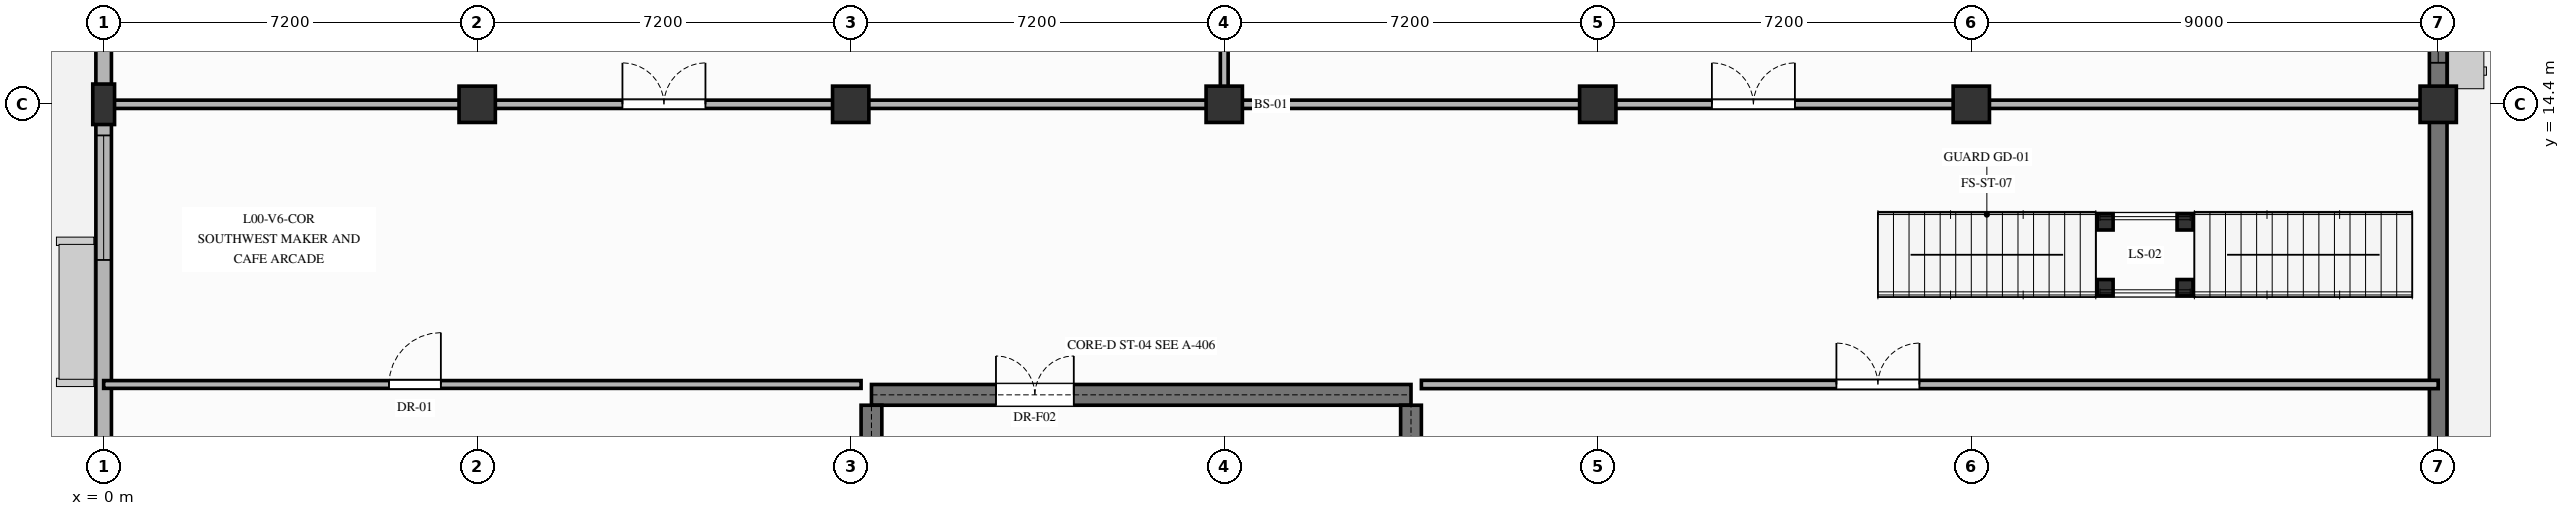
"""IFC4 building model, lengths in metres.
Left out: names, types, materials, properties, quantities, classifications, styles, units other than length and angle.
Written with IfcOpenShell. Run it as: python <this file> out.ifc"""

import sys

from ifc_helpers import new_model, si_unit, direction, frame, frame_2d, origin, origin_2d, place, context, subcontext, project, spatial, rectangle, i_section, extrude, element, fill, save


model = new_model("IFC4")
c1 = context("Model", 3, precision=1e-05, world=origin(), true_north=direction((0.0, 1.0)))
c2 = subcontext(c1, "Body", "Model", "MODEL_VIEW")
j1 = project(units=[si_unit("LENGTHUNIT", "METRE"), si_unit("PLANEANGLEUNIT", "RADIAN")], contexts=[c1])
p1 = place(None, origin())
s1 = spatial("IfcSite", under=j1, at=p1, CompositionType="ELEMENT")
p2 = place(p1, origin())
s2 = spatial("IfcBuilding", under=s1, at=p2, CompositionType="ELEMENT")
p3 = place(p2, origin())
s3 = spatial("IfcBuildingStorey", under=s2, at=p3, CompositionType="ELEMENT", Elevation=0.0)
p4 = place(p3, frame((0.0, 14.4, 0.0), z_axis=(0.0, 0.0, 1.0), x_axis=(1.0, 0.0, 0.0)))
e1 = element("IfcColumn", 1, at=p4, inside=s3, PredefinedType="PILASTER", context=c2, shape_type="SweptSolid", body=[
    extrude(rectangle(XDim=0.42, YDim=0.78, at=origin_2d()), origin(), (0.0, 0.0, 1.0), 5.1),
])
for number, where, z_axis, x_axis in (
    (2, (7.2, 14.4, 0.0), (0.0, 0.0, 1.0), (1.0, 0.0, 0.0)),
    (3, (14.4, 14.4, 0.0), (0.0, 0.0, 1.0), (1.0, 0.0, 0.0)),
    (4, (21.6, 14.4, 0.0), (0.0, 0.0, 1.0), (1.0, 0.0, 0.0)),
    (5, (28.8, 14.4, 0.0), (0.0, 0.0, 1.0), (1.0, 0.0, 0.0)),
    (6, (36.0, 14.4, 0.0), (0.0, 0.0, 1.0), (1.0, 0.0, 0.0)),
    (7, (45.0, 14.4, 0.0), (0.0, 0.0, 1.0), (1.0, 0.0, 0.0)),
):
    element("IfcColumn", number, at=place(p3, frame(where, z_axis=z_axis, x_axis=x_axis)), inside=s3, PredefinedType="COLUMN", context=c2, shape_type="SweptSolid", body=[
        extrude(rectangle(XDim=0.7, YDim=0.7, at=origin_2d()), origin(), (0.0, 0.0, 1.0), 5.1),
    ])
for number, where, z_axis, x_axis in (
    (8, (38.58, 10.865, 0.0), (0.0, 0.0, 1.0), (1.0, 0.0, 0.0)),
    (9, (40.12, 10.865, 0.0), (0.0, 0.0, 1.0), (1.0, 0.0, 0.0)),
    (10, (38.58, 12.135, 0.0), (0.0, 0.0, 1.0), (1.0, 0.0, 0.0)),
    (11, (40.12, 12.135, 0.0), (0.0, 0.0, 1.0), (1.0, 0.0, 0.0)),
):
    element("IfcColumn", number, at=place(p3, frame(where, z_axis=z_axis, x_axis=x_axis)), inside=s3, PredefinedType="COLUMN", context=c2, shape_type="SweptSolid", body=[
        extrude(i_section(OverallWidth=0.307, OverallDepth=0.315, WebThickness=0.012, FlangeThickness=0.019, at=origin_2d()), origin(), (0.0, 0.0, 1.0), 2.33),
    ])
p5 = place(p3, frame((0.0, 7.2, 0.0), z_axis=(0.0, 0.0, 1.0), x_axis=(0.0, 1.0, 0.0)))
e12 = element("IfcWall", 12, at=p5, inside=s3, PredefinedType="SOLIDWALL", context=c2, shape_type="SweptSolid", body=[
    extrude(rectangle(XDim=7.2, YDim=0.3, at=frame_2d((3.6, 0.0))), origin(), (0.0, 0.0, 1.0), 4.115),
])
p6 = place(p5, frame((4.2, 0.0, 0.9)))
e13 = element("IfcOpeningElement", 13, at=p6, cuts=e12, PredefinedType="OPENING", context=c2, shape_type="SweptSolid", body=[
    extrude(rectangle(XDim=2.4, YDim=2.4, at=frame_2d((1.2, 1.2))), frame((0.0, 0.16, 0.0), z_axis=(0.0, -1.0, 0.0), x_axis=(1.0, 0.0, 0.0)), (0.0, 0.0, 1.0), 0.32),
])
p7 = place(p3, frame((0.0, 14.4, 0.0), z_axis=(0.0, 0.0, 1.0), x_axis=(0.0, 1.0, 0.0)))
e14 = element("IfcWall", 14, at=p7, inside=s3, PredefinedType="SOLIDWALL", context=c2, shape_type="SweptSolid", body=[
    extrude(rectangle(XDim=7.2, YDim=0.3, at=frame_2d((3.6, 0.0))), origin(), (0.0, 0.0, 1.0), 4.115),
])
p8 = place(p7, frame((2.0, 0.0, 0.9)))
e15 = element("IfcOpeningElement", 15, at=p8, cuts=e14, PredefinedType="OPENING", context=c2, shape_type="SweptSolid", body=[
    extrude(rectangle(XDim=2.4, YDim=2.4, at=frame_2d((1.2, 1.2))), frame((0.0, 0.16, 0.0), z_axis=(0.0, -1.0, 0.0), x_axis=(1.0, 0.0, 0.0)), (0.0, 0.0, 1.0), 0.32),
])
p9 = place(p3, frame((45.0, 0.0, 0.0), z_axis=(0.0, 0.0, 1.0), x_axis=(0.0, 1.0, 0.0)))
e16 = element("IfcWall", 16, at=p9, inside=s3, PredefinedType="SOLIDWALL", context=c2, shape_type="SweptSolid", body=[
    extrude(rectangle(XDim=28.8, YDim=0.34, at=frame_2d((14.4, 0.0))), origin(), (0.0, 0.0, 1.0), 4.8),
])
p10 = place(p9, frame((18.5, 0.0, 0.0)))
e17 = element("IfcOpeningElement", 17, at=p10, cuts=e16, PredefinedType="OPENING", context=c2, shape_type="SweptSolid", body=[
    extrude(rectangle(XDim=1.6, YDim=2.4, at=frame_2d((0.8, 1.2))), frame((0.0, 0.18, 0.0), z_axis=(0.0, -1.0, 0.0), x_axis=(1.0, 0.0, 0.0)), (0.0, 0.0, 1.0), 0.36),
])
p11 = place(p9, frame((2.8, 0.0, 0.9)))
e18 = element("IfcOpeningElement", 18, at=p11, cuts=e16, PredefinedType="OPENING", context=c2, shape_type="SweptSolid", body=[
    extrude(rectangle(XDim=2.4, YDim=2.4, at=frame_2d((1.2, 1.2))), frame((0.0, 0.18, 0.0), z_axis=(0.0, -1.0, 0.0), x_axis=(1.0, 0.0, 0.0)), (0.0, 0.0, 1.0), 0.36),
])
p12 = place(p9, frame((15.2, 0.0, 0.9)))
e19 = element("IfcOpeningElement", 19, at=p12, cuts=e16, PredefinedType="OPENING", context=c2, shape_type="SweptSolid", body=[
    extrude(rectangle(XDim=1.6, YDim=2.05, at=frame_2d((0.8, 1.025))), frame((0.0, 0.18, 0.0), z_axis=(0.0, -1.0, 0.0), x_axis=(1.0, 0.0, 0.0)), (0.0, 0.0, 1.0), 0.36),
])
p13 = place(p3, frame((14.8, 8.8, 0.0), z_axis=(0.0, 0.0, 1.0), x_axis=(1.0, 0.0, 0.0)))
e20 = element("IfcWall", 20, at=p13, inside=s3, PredefinedType="SHEAR", context=c2, shape_type="SweptSolid", body=[
    extrude(rectangle(XDim=10.4, YDim=0.4, at=frame_2d((5.2, 0.0))), origin(), (0.0, 0.0, 1.0), 4.8),
])
p14 = place(p13, frame((2.4, 0.0, 0.0)))
e21 = element("IfcOpeningElement", 21, at=p14, cuts=e20, PredefinedType="OPENING", context=c2, shape_type="SweptSolid", body=[
    extrude(rectangle(XDim=1.5, YDim=2.2, at=frame_2d((0.75, 1.1))), frame((0.0, 0.21, 0.0), z_axis=(0.0, -1.0, 0.0), x_axis=(1.0, 0.0, 0.0)), (0.0, 0.0, 1.0), 0.42),
])
for number, where, z_axis, x_axis in (
    (22, (14.8, 0.17, 0.0), (0.0, 0.0, 1.0), (0.0, 1.0, 0.0)),
    (23, (25.2, 0.17, 0.0), (0.0, 0.0, 1.0), (0.0, 1.0, 0.0)),
):
    element("IfcWall", number, at=place(p3, frame(where, z_axis=z_axis, x_axis=x_axis)), inside=s3, PredefinedType="SHEAR", context=c2, shape_type="SweptSolid", body=[
        extrude(rectangle(XDim=8.43, YDim=0.4, at=frame_2d((4.215, 0.0))), origin(), (0.0, 0.0, 1.0), 4.8),
    ])
p15 = place(p3, frame((25.4, 9.0, 0.0), z_axis=(0.0, 0.0, 1.0), x_axis=(1.0, 0.0, 0.0)))
e24 = element("IfcWall", 24, at=p15, inside=s3, PredefinedType="PARTITIONING", context=c2, shape_type="SweptSolid", body=[
    extrude(rectangle(XDim=19.6, YDim=0.16, at=frame_2d((9.8, 0.0))), origin(), (0.0, 0.0, 1.0), 4.8),
])
p16 = place(p15, frame((8.0, 0.0, 0.0)))
e25 = element("IfcOpeningElement", 25, at=p16, cuts=e24, PredefinedType="OPENING", context=c2, shape_type="SweptSolid", body=[
    extrude(rectangle(XDim=1.6, YDim=2.2, at=frame_2d((0.8, 1.1))), frame((0.0, 0.09, 0.0), z_axis=(0.0, -1.0, 0.0), x_axis=(1.0, 0.0, 0.0)), (0.0, 0.0, 1.0), 0.18),
])
p17 = place(p3, frame((0.0, 9.0, 0.0), z_axis=(0.0, 0.0, 1.0), x_axis=(1.0, 0.0, 0.0)))
e26 = element("IfcWall", 26, at=p17, inside=s3, PredefinedType="PARTITIONING", context=c2, shape_type="SweptSolid", body=[
    extrude(rectangle(XDim=14.6, YDim=0.15, at=frame_2d((7.3, 0.0))), origin(), (0.0, 0.0, 1.0), 4.8),
])
p18 = place(p17, frame((5.5, 0.0, 0.0)))
e27 = element("IfcOpeningElement", 27, at=p18, cuts=e26, PredefinedType="OPENING", context=c2, shape_type="SweptSolid", body=[
    extrude(rectangle(XDim=1.0, YDim=2.15, at=frame_2d((0.5, 1.075))), frame((0.0, 0.085, 0.0), z_axis=(0.0, -1.0, 0.0), x_axis=(1.0, 0.0, 0.0)), (0.0, 0.0, 1.0), 0.17),
])
p19 = place(p3, frame((0.0, 14.4, 0.0), z_axis=(0.0, 0.0, 1.0), x_axis=(1.0, 0.0, 0.0)))
e28 = element("IfcWall", 28, at=p19, inside=s3, PredefinedType="PARTITIONING", context=c2, shape_type="SweptSolid", body=[
    extrude(rectangle(XDim=45.0, YDim=0.16, at=frame_2d((22.5, 0.0))), origin(), (0.0, 0.0, 1.0), 4.065),
])
p20 = place(p19, frame((10.0, 0.0, 0.0)))
e29 = element("IfcOpeningElement", 29, at=p20, cuts=e28, PredefinedType="OPENING", context=c2, shape_type="SweptSolid", body=[
    extrude(rectangle(XDim=1.6, YDim=2.2, at=frame_2d((0.8, 1.1))), frame((0.0, 0.09, 0.0), z_axis=(0.0, -1.0, 0.0), x_axis=(1.0, 0.0, 0.0)), (0.0, 0.0, 1.0), 0.18),
])
p21 = place(p19, frame((31.0, 0.0, 0.0)))
e30 = element("IfcOpeningElement", 30, at=p21, cuts=e28, PredefinedType="OPENING", context=c2, shape_type="SweptSolid", body=[
    extrude(rectangle(XDim=1.6, YDim=2.2, at=frame_2d((0.8, 1.1))), frame((0.0, 0.09, 0.0), z_axis=(0.0, -1.0, 0.0), x_axis=(1.0, 0.0, 0.0)), (0.0, 0.0, 1.0), 0.18),
])
p22 = place(p3, frame((21.6, 14.4, 0.0), z_axis=(0.0, 0.0, 1.0), x_axis=(0.0, 1.0, 0.0)))
e31 = element("IfcWall", 31, at=p22, inside=s3, PredefinedType="PARTITIONING", context=c2, shape_type="SweptSolid", body=[
    extrude(rectangle(XDim=14.4, YDim=0.15, at=frame_2d((7.2, 0.0))), origin(), (0.0, 0.0, 1.0), 4.015),
])
p23 = place(p6, origin())
e32 = element("IfcWindow", 32, at=p23, inside=s3, PartitioningType="SINGLE_PANEL", PredefinedType="WINDOW", context=c2, shape_type="SweptSolid", body=[
    extrude(rectangle(XDim=2.4, YDim=2.4, at=frame_2d((1.2, 1.2))), frame((0.0, 0.03, 0.0), z_axis=(0.0, -1.0, 0.0), x_axis=(1.0, 0.0, 0.0)), (0.0, 0.0, 1.0), 0.06),
])
fill(e13, e32)
p24 = place(p12, origin())
e33 = element("IfcWindow", 33, at=p24, inside=s3, PartitioningType="SINGLE_PANEL", PredefinedType="WINDOW", context=c2, shape_type="SweptSolid", body=[
    extrude(rectangle(XDim=1.6, YDim=2.05, at=frame_2d((0.8, 1.025))), frame((0.0, 0.03, 0.0), z_axis=(0.0, -1.0, 0.0), x_axis=(1.0, 0.0, 0.0)), (0.0, 0.0, 1.0), 0.06),
])
fill(e19, e33)
p25 = place(p14, origin())
e34 = element("IfcDoor", 34, at=p25, inside=s3, OperationType="DOUBLE_DOOR_SINGLE_SWING", PredefinedType="DOOR", context=c2, shape_type="SweptSolid", body=[
    extrude(rectangle(XDim=1.5, YDim=2.2, at=frame_2d((0.75, 1.1))), frame((0.0, 0.025, 0.0), z_axis=(0.0, -1.0, 0.0), x_axis=(1.0, 0.0, 0.0)), (0.0, 0.0, 1.0), 0.05),
])
fill(e21, e34)
p26 = place(p16, origin())
e35 = element("IfcDoor", 35, at=p26, inside=s3, OperationType="DOUBLE_DOOR_SINGLE_SWING", PredefinedType="DOOR", context=c2, shape_type="SweptSolid", body=[
    extrude(rectangle(XDim=1.6, YDim=2.2, at=frame_2d((0.8, 1.1))), frame((0.0, 0.025, 0.0), z_axis=(0.0, -1.0, 0.0), x_axis=(1.0, 0.0, 0.0)), (0.0, 0.0, 1.0), 0.05),
])
fill(e25, e35)
p27 = place(p18, origin())
e36 = element("IfcDoor", 36, at=p27, inside=s3, OperationType="SINGLE_SWING_RIGHT", PredefinedType="DOOR", context=c2, shape_type="SweptSolid", body=[
    extrude(rectangle(XDim=1.0, YDim=2.15, at=frame_2d((0.5, 1.075))), frame((0.0, 0.025, 0.0), z_axis=(0.0, -1.0, 0.0), x_axis=(1.0, 0.0, 0.0)), (0.0, 0.0, 1.0), 0.05),
])
fill(e27, e36)
p28 = place(p20, origin())
e37 = element("IfcDoor", 37, at=p28, inside=s3, OperationType="DOUBLE_DOOR_SINGLE_SWING", PredefinedType="DOOR", context=c2, shape_type="SweptSolid", body=[
    extrude(rectangle(XDim=1.6, YDim=2.2, at=frame_2d((0.8, 1.1))), frame((0.0, 0.025, 0.0), z_axis=(0.0, -1.0, 0.0), x_axis=(1.0, 0.0, 0.0)), (0.0, 0.0, 1.0), 0.05),
])
fill(e29, e37)
p29 = place(p21, origin())
e38 = element("IfcDoor", 38, at=p29, inside=s3, OperationType="DOUBLE_DOOR_SINGLE_SWING", PredefinedType="DOOR", context=c2, shape_type="SweptSolid", body=[
    extrude(rectangle(XDim=1.6, YDim=2.2, at=frame_2d((0.8, 1.1))), frame((0.0, 0.025, 0.0), z_axis=(0.0, -1.0, 0.0), x_axis=(1.0, 0.0, 0.0)), (0.0, 0.0, 1.0), 0.05),
])
fill(e30, e38)
save(model, sys.argv[1])
